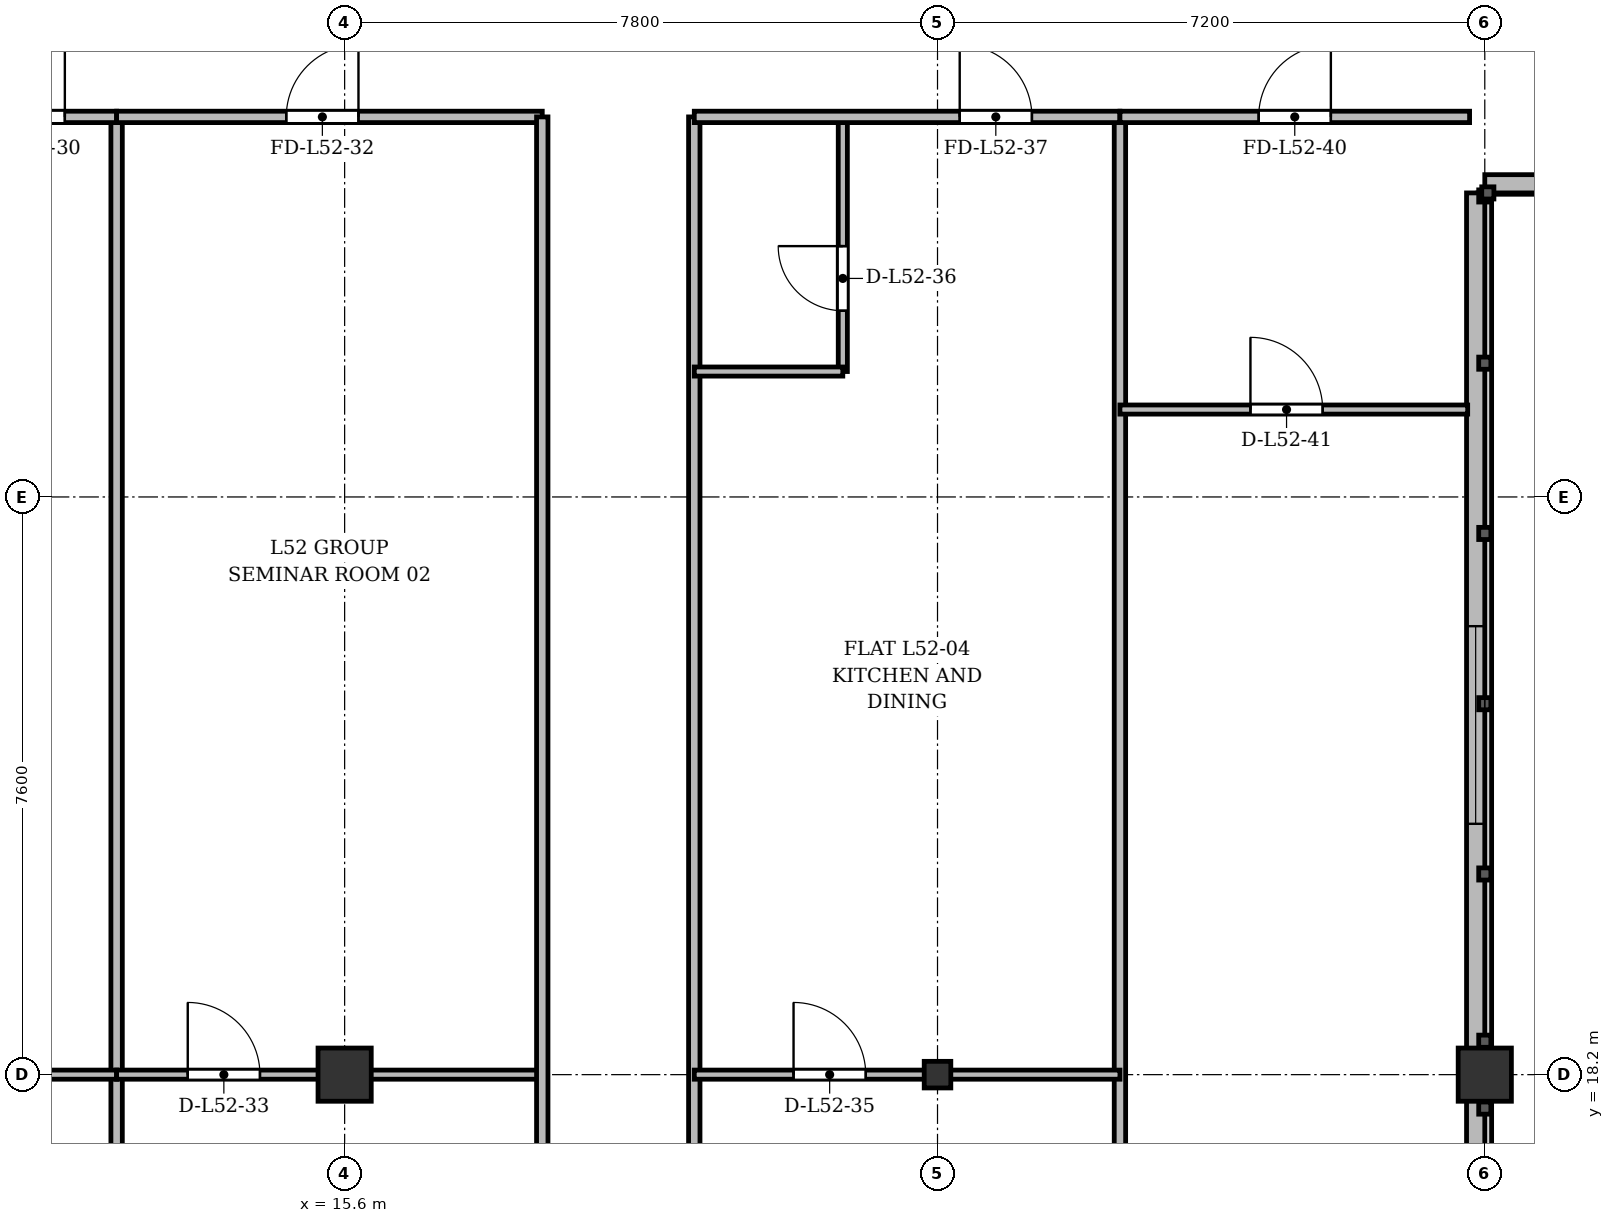
"""IFC4 building model, lengths in metres.
Left out: names, types, materials, properties, quantities, classifications, styles, units other than length and angle.
Written with IfcOpenShell. Run it as: python <this file> out.ifc"""

import sys

from ifc_helpers import new_model, si_unit, direction, frame, frame_2d, origin, origin_2d, place, context, subcontext, project, spatial, rectangle, i_section, extrude, source, transform, mapped, element, fill, save


model = new_model("IFC4")
c1 = context("Model", 3, precision=1e-05, world=origin(), true_north=direction((0.0, 1.0)))
c2 = subcontext(c1, "Body", "Model", "MODEL_VIEW")
j1 = project(units=[si_unit("LENGTHUNIT", "METRE"), si_unit("PLANEANGLEUNIT", "RADIAN")], contexts=[c1])
p1 = place(None, origin())
s1 = spatial("IfcSite", under=j1, at=p1, CompositionType="ELEMENT")
p2 = place(p1, origin())
s2 = spatial("IfcBuilding", under=s1, at=p2, CompositionType="ELEMENT")
p3 = place(p2, frame((0.0, 0.0, 201.3)))
s3 = spatial("IfcBuildingStorey", under=s2, at=p3, CompositionType="ELEMENT", Elevation=201.3)
m1 = source(origin(), c2, "Body", "SweptSolid", [
    extrude(rectangle(XDim=0.7, YDim=0.7, at=origin_2d()), origin(), (0.0, 0.0, 1.0), 3.6),
])
p4 = place(p3, frame((15.6, 18.2, 0.0), z_axis=(0.0, 0.0, 1.0), x_axis=(1.0, 0.0, 0.0)))
e1 = element("IfcColumn", 1, at=p4, inside=s3, PredefinedType="COLUMN", context=c2, shape_type="MappedRepresentation", body=[
    mapped(m1, transform((0.0, 0.0, 0.0), x_axis=(1.0, 0.0, 0.0), y_axis=(0.0, 1.0, 0.0), z_axis=(0.0, 0.0, 1.0), scale=1.0)),
])
m2 = source(origin(), c2, "Body", "SweptSolid", [
    extrude(i_section(OverallWidth=0.35, OverallDepth=0.35, WebThickness=0.018, FlangeThickness=0.028, at=origin_2d()), origin(), (0.0, 0.0, 1.0), 3.6),
])
p5 = place(p3, frame((23.4, 18.2, 0.0), z_axis=(0.0, 0.0, 1.0), x_axis=(1.0, 0.0, 0.0)))
e2 = element("IfcColumn", 2, at=p5, inside=s3, PredefinedType="COLUMN", context=c2, shape_type="MappedRepresentation", body=[
    mapped(m2, transform((0.0, 0.0, 0.0), x_axis=(1.0, 0.0, 0.0), y_axis=(0.0, 1.0, 0.0), z_axis=(0.0, 0.0, 1.0), scale=1.0)),
])
p6 = place(p3, frame((30.6, 18.2, 0.0), z_axis=(0.0, 0.0, 1.0), x_axis=(1.0, 0.0, 0.0)))
e3 = element("IfcColumn", 3, at=p6, inside=s3, PredefinedType="COLUMN", context=c2, shape_type="MappedRepresentation", body=[
    mapped(m1, transform((0.0, 0.0, 0.0), x_axis=(1.0, 0.0, 0.0), y_axis=(0.0, 1.0, 0.0), z_axis=(0.0, 0.0, 1.0), scale=1.0)),
])
p7 = place(p3, frame((43.8, 29.92, 0.0), z_axis=(0.0, 0.0, 1.0), x_axis=(-1.0, 0.0, 0.0)))
e4 = element("IfcWall", 4, at=p7, inside=s3, PredefinedType="SOLIDWALL", context=c2, shape_type="SweptSolid", body=[
    extrude(rectangle(XDim=13.2, YDim=0.24, at=frame_2d((6.6, 0.0))), origin(), (0.0, 0.0, 1.0), 2.72),
])
p8 = place(p7, frame((5.85, 0.0, 0.9)))
e5 = element("IfcOpeningElement", 5, at=p8, cuts=e4, PredefinedType="OPENING", context=c2, shape_type="SweptSolid", body=[
    extrude(rectangle(XDim=1.5, YDim=1.72, at=frame_2d((0.75, 0.86))), frame((0.0, 0.13, 0.0), z_axis=(0.0, -1.0, 0.0), x_axis=(1.0, 0.0, 0.0)), (0.0, 0.0, 1.0), 0.26),
])
p9 = place(p3, frame((30.48, 29.8, 0.0), z_axis=(0.0, 0.0, 1.0), x_axis=(0.0, -1.0, 0.0)))
e6 = element("IfcWall", 6, at=p9, inside=s3, PredefinedType="SOLIDWALL", context=c2, shape_type="SweptSolid", body=[
    extrude(rectangle(XDim=26.4, YDim=0.24, at=frame_2d((13.2, 0.0))), origin(), (0.0, 0.0, 1.0), 2.72),
])
p10 = place(p9, frame((20.75, 0.0, 0.92)))
e7 = element("IfcOpeningElement", 7, at=p10, cuts=e6, PredefinedType="OPENING", context=c2, shape_type="SweptSolid", body=[
    extrude(rectangle(XDim=1.2, YDim=1.65, at=frame_2d((0.6, 0.825))), frame((0.0, 0.13, 0.0), z_axis=(0.0, -1.0, 0.0), x_axis=(1.0, 0.0, 0.0)), (0.0, 0.0, 1.0), 0.26),
])
p11 = place(p9, frame((17.1, 0.0, 0.92)))
e8 = element("IfcOpeningElement", 8, at=p11, cuts=e6, PredefinedType="OPENING", context=c2, shape_type="SweptSolid", body=[
    extrude(rectangle(XDim=2.6, YDim=1.7, at=frame_2d((1.3, 0.85))), frame((0.0, 0.13, 0.0), z_axis=(0.0, -1.0, 0.0), x_axis=(1.0, 0.0, 0.0)), (0.0, 0.0, 1.0), 0.26),
])
p12 = place(p9, frame((12.9, 0.0, 0.92)))
e9 = element("IfcOpeningElement", 9, at=p12, cuts=e6, PredefinedType="OPENING", context=c2, shape_type="SweptSolid", body=[
    extrude(rectangle(XDim=2.6, YDim=1.7, at=frame_2d((1.3, 0.85))), frame((0.0, 0.13, 0.0), z_axis=(0.0, -1.0, 0.0), x_axis=(1.0, 0.0, 0.0)), (0.0, 0.0, 1.0), 0.26),
])
p13 = place(p9, frame((5.7, 0.0, 0.92)))
e10 = element("IfcOpeningElement", 10, at=p13, cuts=e6, PredefinedType="OPENING", context=c2, shape_type="SweptSolid", body=[
    extrude(rectangle(XDim=2.6, YDim=1.7, at=frame_2d((1.3, 0.85))), frame((0.0, 0.13, 0.0), z_axis=(0.0, -1.0, 0.0), x_axis=(1.0, 0.0, 0.0)), (0.0, 0.0, 1.0), 0.26),
])
for number, where, z_axis, x_axis in (
    (11, (12.6, 3.625, 0.0), (0.0, 0.0, 1.0), (0.0, 1.0, 0.0)),
    (12, (25.8, 3.625, 0.0), (0.0, 0.0, 1.0), (0.0, 1.0, 0.0)),
):
    element("IfcWall", number, at=place(p3, frame(where, z_axis=z_axis, x_axis=x_axis)), inside=s3, PredefinedType="PARTITIONING", context=c2, shape_type="SweptSolid", body=[
        extrude(rectangle(XDim=27.175, YDim=0.15, at=frame_2d((13.587, 0.0))), origin(), (0.0, 0.0, 1.0), 2.77),
    ])
p14 = place(p3, frame((8.24, 18.2, 0.0), z_axis=(0.0, 0.0, 1.0), x_axis=(1.0, 0.0, 0.0)))
e13 = element("IfcWall", 13, at=p14, inside=s3, PredefinedType="PARTITIONING", context=c2, shape_type="SweptSolid", body=[
    extrude(rectangle(XDim=4.36, YDim=0.12, at=frame_2d((2.18, 0.0))), origin(), (0.0, 0.0, 1.0), 2.77),
])
p15 = place(p14, frame((1.705, 0.0, 0.0)))
e14 = element("IfcOpeningElement", 14, at=p15, cuts=e13, PredefinedType="OPENING", context=c2, shape_type="SweptSolid", body=[
    extrude(rectangle(XDim=0.95, YDim=2.15, at=frame_2d((0.475, 1.075))), frame((0.0, 0.07, 0.0), z_axis=(0.0, -1.0, 0.0), x_axis=(1.0, 0.0, 0.0)), (0.0, 0.0, 1.0), 0.14),
])
p16 = place(p3, frame((8.225, 30.8, 0.0), z_axis=(0.0, 0.0, 1.0), x_axis=(1.0, 0.0, 0.0)))
e15 = element("IfcWall", 15, at=p16, inside=s3, PredefinedType="PARTITIONING", context=c2, shape_type="SweptSolid", body=[
    extrude(rectangle(XDim=4.375, YDim=0.15, at=frame_2d((2.188, 0.0))), origin(), (0.0, 0.0, 1.0), 2.72),
])
p17 = place(p16, frame((2.744, 0.0, 0.0)))
e16 = element("IfcOpeningElement", 16, at=p17, cuts=e15, PredefinedType="OPENING", context=c2, shape_type="SweptSolid", body=[
    extrude(rectangle(XDim=0.95, YDim=2.15, at=frame_2d((0.475, 1.075))), frame((0.0, 0.085, 0.0), z_axis=(0.0, -1.0, 0.0), x_axis=(1.0, 0.0, 0.0)), (0.0, 0.0, 1.0), 0.17),
])
p18 = place(p3, frame((12.6, 30.8, 0.0), z_axis=(0.0, 0.0, 1.0), x_axis=(1.0, 0.0, 0.0)))
e17 = element("IfcWall", 17, at=p18, inside=s3, PredefinedType="PARTITIONING", context=c2, shape_type="SweptSolid", body=[
    extrude(rectangle(XDim=5.6, YDim=0.15, at=frame_2d((2.8, 0.0))), origin(), (0.0, 0.0, 1.0), 2.72),
])
p19 = place(p18, frame((2.232, 0.0, 0.0)))
e18 = element("IfcOpeningElement", 18, at=p19, cuts=e17, PredefinedType="OPENING", context=c2, shape_type="SweptSolid", body=[
    extrude(rectangle(XDim=0.95, YDim=2.15, at=frame_2d((0.475, 1.075))), frame((0.0, 0.085, 0.0), z_axis=(0.0, -1.0, 0.0), x_axis=(1.0, 0.0, 0.0)), (0.0, 0.0, 1.0), 0.17),
])
p20 = place(p3, frame((12.6, 18.2, 0.0), z_axis=(0.0, 0.0, 1.0), x_axis=(1.0, 0.0, 0.0)))
e19 = element("IfcWall", 19, at=p20, inside=s3, PredefinedType="PARTITIONING", context=c2, shape_type="SweptSolid", body=[
    extrude(rectangle(XDim=5.6, YDim=0.12, at=frame_2d((2.8, 0.0))), origin(), (0.0, 0.0, 1.0), 2.77),
])
p21 = place(p20, frame((0.936, 0.0, 0.0)))
e20 = element("IfcOpeningElement", 20, at=p21, cuts=e19, PredefinedType="OPENING", context=c2, shape_type="SweptSolid", body=[
    extrude(rectangle(XDim=0.95, YDim=2.15, at=frame_2d((0.475, 1.075))), frame((0.0, 0.07, 0.0), z_axis=(0.0, -1.0, 0.0), x_axis=(1.0, 0.0, 0.0)), (0.0, 0.0, 1.0), 0.14),
])
for number, where, z_axis, x_axis in (
    (21, (18.2, 3.625, 0.0), (0.0, 0.0, 1.0), (0.0, 1.0, 0.0)),
    (22, (20.2, 3.625, 0.0), (0.0, 0.0, 1.0), (0.0, 1.0, 0.0)),
):
    element("IfcWall", number, at=place(p3, frame(where, z_axis=z_axis, x_axis=x_axis)), inside=s3, PredefinedType="PARTITIONING", context=c2, shape_type="SweptSolid", body=[
        extrude(rectangle(XDim=27.175, YDim=0.15, at=frame_2d((13.587, 0.0))), origin(), (0.0, 0.0, 1.0), 2.77),
    ])
p22 = place(p3, frame((20.2, 18.2, 0.0), z_axis=(0.0, 0.0, 1.0), x_axis=(1.0, 0.0, 0.0)))
e23 = element("IfcWall", 23, at=p22, inside=s3, PredefinedType="PARTITIONING", context=c2, shape_type="SweptSolid", body=[
    extrude(rectangle(XDim=5.6, YDim=0.12, at=frame_2d((2.8, 0.0))), origin(), (0.0, 0.0, 1.0), 2.77),
])
p23 = place(p22, frame((1.306, 0.0, 0.0)))
e24 = element("IfcOpeningElement", 24, at=p23, cuts=e23, PredefinedType="OPENING", context=c2, shape_type="SweptSolid", body=[
    extrude(rectangle(XDim=0.95, YDim=2.15, at=frame_2d((0.475, 1.075))), frame((0.0, 0.07, 0.0), z_axis=(0.0, -1.0, 0.0), x_axis=(1.0, 0.0, 0.0)), (0.0, 0.0, 1.0), 0.14),
])
p24 = place(p3, frame((22.154, 27.45, 0.0), z_axis=(0.0, 0.0, 1.0), x_axis=(0.0, 1.0, 0.0)))
e25 = element("IfcWall", 25, at=p24, inside=s3, PredefinedType="PARTITIONING", context=c2, shape_type="SweptSolid", body=[
    extrude(rectangle(XDim=3.35, YDim=0.12, at=frame_2d((1.675, 0.0))), origin(), (0.0, 0.0, 1.0), 3.22),
])
p25 = place(p24, frame((0.8, 0.0, 0.0)))
e26 = element("IfcOpeningElement", 26, at=p25, cuts=e25, PredefinedType="OPENING", context=c2, shape_type="SweptSolid", body=[
    extrude(rectangle(XDim=0.85, YDim=2.1, at=frame_2d((0.425, 1.05))), frame((0.0, 0.07, 0.0), z_axis=(0.0, -1.0, 0.0), x_axis=(1.0, 0.0, 0.0)), (0.0, 0.0, 1.0), 0.14),
])
p26 = place(p3, frame((20.2, 27.45, 0.0), z_axis=(0.0, 0.0, 1.0), x_axis=(1.0, 0.0, 0.0)))
e27 = element("IfcWall", 27, at=p26, inside=s3, PredefinedType="PARTITIONING", context=c2, shape_type="SweptSolid", body=[
    extrude(rectangle(XDim=1.954, YDim=0.12, at=frame_2d((0.977, 0.0))), origin(), (0.0, 0.0, 1.0), 3.22),
])
p27 = place(p3, frame((20.2, 30.8, 0.0), z_axis=(0.0, 0.0, 1.0), x_axis=(1.0, 0.0, 0.0)))
e28 = element("IfcWall", 28, at=p27, inside=s3, PredefinedType="PARTITIONING", context=c2, shape_type="SweptSolid", body=[
    extrude(rectangle(XDim=5.6, YDim=0.15, at=frame_2d((2.8, 0.0))), origin(), (0.0, 0.0, 1.0), 2.72),
])
p28 = place(p27, frame((3.492, 0.0, 0.0)))
e29 = element("IfcOpeningElement", 29, at=p28, cuts=e28, PredefinedType="OPENING", context=c2, shape_type="SweptSolid", body=[
    extrude(rectangle(XDim=0.95, YDim=2.15, at=frame_2d((0.475, 1.075))), frame((0.0, 0.085, 0.0), z_axis=(0.0, -1.0, 0.0), x_axis=(1.0, 0.0, 0.0)), (0.0, 0.0, 1.0), 0.17),
])
p29 = place(p3, frame((25.8, 30.8, 0.0), z_axis=(0.0, 0.0, 1.0), x_axis=(1.0, 0.0, 0.0)))
e30 = element("IfcWall", 30, at=p29, inside=s3, PredefinedType="PARTITIONING", context=c2, shape_type="SweptSolid", body=[
    extrude(rectangle(XDim=4.6, YDim=0.15, at=frame_2d((2.3, 0.0))), origin(), (0.0, 0.0, 1.0), 3.22),
])
p30 = place(p29, frame((1.825, 0.0, 0.0)))
e31 = element("IfcOpeningElement", 31, at=p30, cuts=e30, PredefinedType="OPENING", context=c2, shape_type="SweptSolid", body=[
    extrude(rectangle(XDim=0.95, YDim=2.15, at=frame_2d((0.475, 1.075))), frame((0.0, 0.085, 0.0), z_axis=(0.0, -1.0, 0.0), x_axis=(1.0, 0.0, 0.0)), (0.0, 0.0, 1.0), 0.17),
])
p31 = place(p3, frame((25.8, 26.95, 0.0), z_axis=(0.0, 0.0, 1.0), x_axis=(1.0, 0.0, 0.0)))
e32 = element("IfcWall", 32, at=p31, inside=s3, PredefinedType="PARTITIONING", context=c2, shape_type="SweptSolid", body=[
    extrude(rectangle(XDim=4.575, YDim=0.12, at=frame_2d((2.288, 0.0))), origin(), (0.0, 0.0, 1.0), 3.22),
])
p32 = place(p31, frame((1.717, 0.0, 0.0)))
e33 = element("IfcOpeningElement", 33, at=p32, cuts=e32, PredefinedType="OPENING", context=c2, shape_type="SweptSolid", body=[
    extrude(rectangle(XDim=0.95, YDim=2.15, at=frame_2d((0.475, 1.075))), frame((0.0, 0.07, 0.0), z_axis=(0.0, -1.0, 0.0), x_axis=(1.0, 0.0, 0.0)), (0.0, 0.0, 1.0), 0.14),
])
m3 = source(origin(), c2, "Body", "SweptSolid", [
    extrude(rectangle(XDim=2.6, YDim=1.7, at=frame_2d((1.3, 0.85))), frame((0.0, 0.03, 0.0), z_axis=(0.0, -1.0, 0.0), x_axis=(1.0, 0.0, 0.0)), (0.0, 0.0, 1.0), 0.06),
])
p33 = place(p13, origin())
e34 = element("IfcWindow", 34, at=p33, inside=s3, PartitioningType="SINGLE_PANEL", PredefinedType="WINDOW", context=c2, shape_type="MappedRepresentation", body=[
    mapped(m3, transform((0.0, 0.0, 0.0), x_axis=(1.0, 0.0, 0.0), y_axis=(0.0, 1.0, 0.0), z_axis=(0.0, 0.0, 1.0), scale=1.0)),
])
fill(e10, e34)
m4 = source(origin(), c2, "Body", "SweptSolid", [
    extrude(rectangle(XDim=0.95, YDim=2.15, at=frame_2d((0.475, 1.075))), frame((0.0, 0.025, 0.0), z_axis=(0.0, -1.0, 0.0), x_axis=(1.0, 0.0, 0.0)), (0.0, 0.0, 1.0), 0.05),
])
p34 = place(p17, origin())
e35 = element("IfcDoor", 35, at=p34, inside=s3, OperationType="SINGLE_SWING_RIGHT", PredefinedType="DOOR", context=c2, shape_type="MappedRepresentation", body=[
    mapped(m4, transform((0.0, 0.0, 0.0), x_axis=(1.0, 0.0, 0.0), y_axis=(0.0, 1.0, 0.0), z_axis=(0.0, 0.0, 1.0), scale=1.0)),
])
fill(e16, e35)
p35 = place(p19, origin())
e36 = element("IfcDoor", 36, at=p35, inside=s3, OperationType="SINGLE_SWING_RIGHT", PredefinedType="DOOR", context=c2, shape_type="MappedRepresentation", body=[
    mapped(m4, transform((0.0, 0.0, 0.0), x_axis=(1.0, 0.0, 0.0), y_axis=(0.0, 1.0, 0.0), z_axis=(0.0, 0.0, 1.0), scale=1.0)),
])
fill(e18, e36)
p36 = place(p21, origin())
e37 = element("IfcDoor", 37, at=p36, inside=s3, OperationType="SINGLE_SWING_LEFT", PredefinedType="DOOR", context=c2, shape_type="MappedRepresentation", body=[
    mapped(m4, transform((0.0, 0.0, 0.0), x_axis=(1.0, 0.0, 0.0), y_axis=(0.0, 1.0, 0.0), z_axis=(0.0, 0.0, 1.0), scale=1.0)),
])
fill(e20, e37)
p37 = place(p23, origin())
e38 = element("IfcDoor", 38, at=p37, inside=s3, OperationType="SINGLE_SWING_LEFT", PredefinedType="DOOR", context=c2, shape_type="MappedRepresentation", body=[
    mapped(m4, transform((0.0, 0.0, 0.0), x_axis=(1.0, 0.0, 0.0), y_axis=(0.0, 1.0, 0.0), z_axis=(0.0, 0.0, 1.0), scale=1.0)),
])
fill(e24, e38)
m5 = source(origin(), c2, "Body", "SweptSolid", [
    extrude(rectangle(XDim=0.85, YDim=2.1, at=frame_2d((0.425, 1.05))), frame((0.0, 0.025, 0.0), z_axis=(0.0, -1.0, 0.0), x_axis=(1.0, 0.0, 0.0)), (0.0, 0.0, 1.0), 0.05),
])
p38 = place(p25, origin())
e39 = element("IfcDoor", 39, at=p38, inside=s3, OperationType="SINGLE_SWING_RIGHT", PredefinedType="DOOR", context=c2, shape_type="MappedRepresentation", body=[
    mapped(m5, transform((0.0, 0.0, 0.0), x_axis=(1.0, 0.0, 0.0), y_axis=(0.0, 1.0, 0.0), z_axis=(0.0, 0.0, 1.0), scale=1.0)),
])
fill(e26, e39)
p39 = place(p28, origin())
e40 = element("IfcDoor", 40, at=p39, inside=s3, OperationType="SINGLE_SWING_LEFT", PredefinedType="DOOR", context=c2, shape_type="MappedRepresentation", body=[
    mapped(m4, transform((0.0, 0.0, 0.0), x_axis=(1.0, 0.0, 0.0), y_axis=(0.0, 1.0, 0.0), z_axis=(0.0, 0.0, 1.0), scale=1.0)),
])
fill(e29, e40)
p40 = place(p30, origin())
e41 = element("IfcDoor", 41, at=p40, inside=s3, OperationType="SINGLE_SWING_RIGHT", PredefinedType="DOOR", context=c2, shape_type="MappedRepresentation", body=[
    mapped(m4, transform((0.0, 0.0, 0.0), x_axis=(1.0, 0.0, 0.0), y_axis=(0.0, 1.0, 0.0), z_axis=(0.0, 0.0, 1.0), scale=1.0)),
])
fill(e31, e41)
p41 = place(p32, origin())
e42 = element("IfcDoor", 42, at=p41, inside=s3, OperationType="SINGLE_SWING_LEFT", PredefinedType="DOOR", context=c2, shape_type="MappedRepresentation", body=[
    mapped(m4, transform((0.0, 0.0, 0.0), x_axis=(1.0, 0.0, 0.0), y_axis=(0.0, 1.0, 0.0), z_axis=(0.0, 0.0, 1.0), scale=1.0)),
])
fill(e33, e42)
save(model, sys.argv[1])
